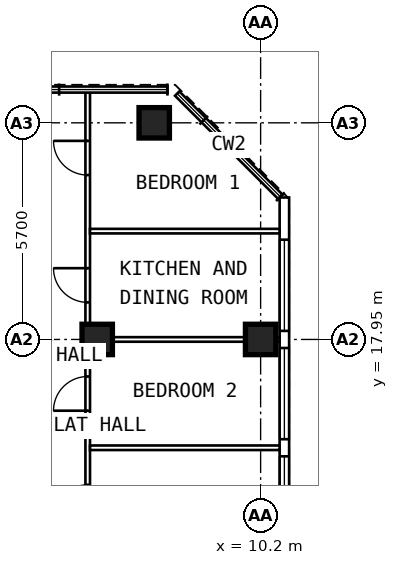
"""IFC4 building model, lengths in metres.
Left out: names, types, materials, properties, quantities, classifications, styles, units other than length and angle.
Written with IfcOpenShell. Run it as: python <this file> out.ifc"""

import sys

from ifc_helpers import new_model, si_unit, direction, frame, frame_2d, origin, origin_2d, place, context, subcontext, project, spatial, rectangle, extrude, element, fill, save


model = new_model("IFC4")
c1 = context("Model", 3, precision=1e-05, world=origin(), true_north=direction((0.0, 1.0)))
c2 = subcontext(c1, "Body", "Model", "MODEL_VIEW")
j1 = project(units=[si_unit("LENGTHUNIT", "METRE"), si_unit("PLANEANGLEUNIT", "RADIAN")], contexts=[c1])
p1 = place(None, origin())
s1 = spatial("IfcSite", under=j1, at=p1, CompositionType="ELEMENT")
p2 = place(p1, origin())
s2 = spatial("IfcBuilding", under=s1, at=p2, CompositionType="ELEMENT")
p3 = place(p2, frame((0.0, 0.0, 289.0)))
s3 = spatial("IfcBuildingStorey", under=s2, at=p3, CompositionType="ELEMENT", Elevation=289.0)
for number, where, z_axis, x_axis in (
    (1, (10.2, 17.95, 0.0), (0.0, 0.0, 1.0), (0.0, 1.0, 0.0)),
    (2, (7.4, 23.65, 0.0), (0.0, 0.0, 1.0), (0.0, 1.0, 0.0)),
    (3, (5.9, 17.95, 0.0), (0.0, 0.0, 1.0), (0.0, 1.0, 0.0)),
):
    element("IfcColumn", number, at=place(p3, frame(where, z_axis=z_axis, x_axis=x_axis)), inside=s3, PredefinedType="COLUMN", context=c2, shape_type="SweptSolid", body=[
        extrude(rectangle(XDim=0.8, YDim=0.8, at=origin_2d()), origin(), (0.0, 0.0, 1.0), 3.6),
    ])
p4 = place(p3, frame((10.825, 6.409, 0.0), z_axis=(0.0, 0.0, 1.0), x_axis=(0.0, 1.0, 0.0)))
e4 = element("IfcWall", 4, at=p4, inside=s3, PredefinedType="SOLIDWALL", context=c2, shape_type="SweptSolid", body=[
    extrude(rectangle(XDim=15.276, YDim=0.25, at=frame_2d((7.638, 0.0))), origin(), (0.0, 0.0, 1.0), 3.35),
])
p5 = place(p4, frame((0.366, 0.0, 0.6)))
e5 = element("IfcOpeningElement", 5, at=p5, cuts=e4, PredefinedType="OPENING", context=c2, shape_type="SweptSolid", body=[
    extrude(rectangle(XDim=2.4, YDim=2.0, at=frame_2d((1.2, 1.0))), frame((0.0, 0.137, 0.0), z_axis=(0.0, -1.0, 0.0), x_axis=(1.0, 0.0, 0.0)), (0.0, 0.0, 1.0), 0.274),
])
p6 = place(p4, frame((3.216, 0.0, 0.6)))
e6 = element("IfcOpeningElement", 6, at=p6, cuts=e4, PredefinedType="OPENING", context=c2, shape_type="SweptSolid", body=[
    extrude(rectangle(XDim=2.4, YDim=2.0, at=frame_2d((1.2, 1.0))), frame((0.0, 0.137, 0.0), z_axis=(0.0, -1.0, 0.0), x_axis=(1.0, 0.0, 0.0)), (0.0, 0.0, 1.0), 0.274),
])
p7 = place(p4, frame((6.066, 0.0, 0.6)))
e7 = element("IfcOpeningElement", 7, at=p7, cuts=e4, PredefinedType="OPENING", context=c2, shape_type="SweptSolid", body=[
    extrude(rectangle(XDim=2.4, YDim=2.0, at=frame_2d((1.2, 1.0))), frame((0.0, 0.137, 0.0), z_axis=(0.0, -1.0, 0.0), x_axis=(1.0, 0.0, 0.0)), (0.0, 0.0, 1.0), 0.274),
])
p8 = place(p4, frame((8.916, 0.0, 0.6)))
e8 = element("IfcOpeningElement", 8, at=p8, cuts=e4, PredefinedType="OPENING", context=c2, shape_type="SweptSolid", body=[
    extrude(rectangle(XDim=2.4, YDim=2.0, at=frame_2d((1.2, 1.0))), frame((0.0, 0.137, 0.0), z_axis=(0.0, -1.0, 0.0), x_axis=(1.0, 0.0, 0.0)), (0.0, 0.0, 1.0), 0.274),
])
p9 = place(p4, frame((11.766, 0.0, 0.6)))
e9 = element("IfcOpeningElement", 9, at=p9, cuts=e4, PredefinedType="OPENING", context=c2, shape_type="SweptSolid", body=[
    extrude(rectangle(XDim=2.4, YDim=2.0, at=frame_2d((1.2, 1.0))), frame((0.0, 0.137, 0.0), z_axis=(0.0, -1.0, 0.0), x_axis=(1.0, 0.0, 0.0)), (0.0, 0.0, 1.0), 0.274),
])
p10 = place(p3, frame((5.65, 9.6, 0.0), z_axis=(0.0, 0.0, 1.0), x_axis=(0.0, 1.0, 0.0)))
e10 = element("IfcWall", 10, at=p10, inside=s3, PredefinedType="PARTITIONING", context=c2, shape_type="SweptSolid", body=[
    extrude(rectangle(XDim=14.845, YDim=0.12, at=frame_2d((7.422, 0.0))), origin(), (0.0, 0.0, 1.0), 3.35),
])
p11 = place(p10, frame((1.075, 0.0, 0.0)))
e11 = element("IfcOpeningElement", 11, at=p11, cuts=e10, PredefinedType="OPENING", context=c2, shape_type="SweptSolid", body=[
    extrude(rectangle(XDim=0.9, YDim=2.1, at=frame_2d((0.45, 1.05))), frame((0.0, 0.072, 0.0), z_axis=(0.0, -1.0, 0.0), x_axis=(1.0, 0.0, 0.0)), (0.0, 0.0, 1.0), 0.144),
])
p12 = place(p10, frame((3.625, 0.0, 0.0)))
e12 = element("IfcOpeningElement", 12, at=p12, cuts=e10, PredefinedType="OPENING", context=c2, shape_type="SweptSolid", body=[
    extrude(rectangle(XDim=0.9, YDim=2.1, at=frame_2d((0.45, 1.05))), frame((0.0, 0.072, 0.0), z_axis=(0.0, -1.0, 0.0), x_axis=(1.0, 0.0, 0.0)), (0.0, 0.0, 1.0), 0.144),
])
p13 = place(p10, frame((6.475, 0.0, 0.0)))
e13 = element("IfcOpeningElement", 13, at=p13, cuts=e10, PredefinedType="OPENING", context=c2, shape_type="SweptSolid", body=[
    extrude(rectangle(XDim=0.9, YDim=2.1, at=frame_2d((0.45, 1.05))), frame((0.0, 0.072, 0.0), z_axis=(0.0, -1.0, 0.0), x_axis=(1.0, 0.0, 0.0)), (0.0, 0.0, 1.0), 0.144),
])
p14 = place(p10, frame((9.325, 0.0, 0.0)))
e14 = element("IfcOpeningElement", 14, at=p14, cuts=e10, PredefinedType="OPENING", context=c2, shape_type="SweptSolid", body=[
    extrude(rectangle(XDim=0.9, YDim=2.1, at=frame_2d((0.45, 1.05))), frame((0.0, 0.072, 0.0), z_axis=(0.0, -1.0, 0.0), x_axis=(1.0, 0.0, 0.0)), (0.0, 0.0, 1.0), 0.144),
])
p15 = place(p10, frame((12.675, 0.0, 0.0)))
e15 = element("IfcOpeningElement", 15, at=p15, cuts=e10, PredefinedType="OPENING", context=c2, shape_type="SweptSolid", body=[
    extrude(rectangle(XDim=0.9, YDim=2.1, at=frame_2d((0.45, 1.05))), frame((0.0, 0.072, 0.0), z_axis=(0.0, -1.0, 0.0), x_axis=(1.0, 0.0, 0.0)), (0.0, 0.0, 1.0), 0.144),
])
p16 = place(p3, frame((5.71, 15.1, 0.0), z_axis=(0.0, 0.0, 1.0), x_axis=(1.0, 0.0, 0.0)))
e16 = element("IfcWall", 16, at=p16, inside=s3, PredefinedType="PARTITIONING", context=c2, shape_type="SweptSolid", body=[
    extrude(rectangle(XDim=4.99, YDim=0.12, at=frame_2d((2.495, 0.0))), origin(), (0.0, 0.0, 1.0), 3.35),
])
p17 = place(p3, frame((5.71, 17.95, 0.0), z_axis=(0.0, 0.0, 1.0), x_axis=(1.0, 0.0, 0.0)))
e17 = element("IfcWall", 17, at=p17, inside=s3, PredefinedType="PARTITIONING", context=c2, shape_type="SweptSolid", body=[
    extrude(rectangle(XDim=4.99, YDim=0.12, at=frame_2d((2.495, 0.0))), origin(), (0.0, 0.0, 1.0), 2.45),
])
p18 = place(p3, frame((5.71, 20.8, 0.0), z_axis=(0.0, 0.0, 1.0), x_axis=(1.0, 0.0, 0.0)))
e18 = element("IfcWall", 18, at=p18, inside=s3, PredefinedType="PARTITIONING", context=c2, shape_type="SweptSolid", body=[
    extrude(rectangle(XDim=4.99, YDim=0.12, at=frame_2d((2.495, 0.0))), origin(), (0.0, 0.0, 1.0), 3.35),
])
p19 = place(p7, origin())
e19 = element("IfcWindow", 19, at=p19, inside=s3, PartitioningType="SINGLE_PANEL", PredefinedType="WINDOW", context=c2, shape_type="SweptSolid", body=[
    extrude(rectangle(XDim=2.4, YDim=2.0, at=frame_2d((1.2, 1.0))), frame((0.0, 0.03, 0.0), z_axis=(0.0, -1.0, 0.0), x_axis=(1.0, 0.0, 0.0)), (0.0, 0.0, 1.0), 0.06),
])
fill(e7, e19)
p20 = place(p8, origin())
e20 = element("IfcWindow", 20, at=p20, inside=s3, PartitioningType="SINGLE_PANEL", PredefinedType="WINDOW", context=c2, shape_type="SweptSolid", body=[
    extrude(rectangle(XDim=2.4, YDim=2.0, at=frame_2d((1.2, 1.0))), frame((0.0, 0.03, 0.0), z_axis=(0.0, -1.0, 0.0), x_axis=(1.0, 0.0, 0.0)), (0.0, 0.0, 1.0), 0.06),
])
fill(e8, e20)
p21 = place(p9, origin())
e21 = element("IfcWindow", 21, at=p21, inside=s3, PartitioningType="SINGLE_PANEL", PredefinedType="WINDOW", context=c2, shape_type="SweptSolid", body=[
    extrude(rectangle(XDim=2.4, YDim=2.0, at=frame_2d((1.2, 1.0))), frame((0.0, 0.03, 0.0), z_axis=(0.0, -1.0, 0.0), x_axis=(1.0, 0.0, 0.0)), (0.0, 0.0, 1.0), 0.06),
])
fill(e9, e21)
p22 = place(p12, origin())
e22 = element("IfcDoor", 22, at=p22, inside=s3, OperationType="SINGLE_SWING_LEFT", PredefinedType="DOOR", context=c2, shape_type="SweptSolid", body=[
    extrude(rectangle(XDim=0.9, YDim=2.1, at=frame_2d((0.45, 1.05))), frame((0.0, 0.025, 0.0), z_axis=(0.0, -1.0, 0.0), x_axis=(1.0, 0.0, 0.0)), (0.0, 0.0, 1.0), 0.05),
])
fill(e12, e22)
p23 = place(p13, origin())
e23 = element("IfcDoor", 23, at=p23, inside=s3, OperationType="SINGLE_SWING_LEFT", PredefinedType="DOOR", context=c2, shape_type="SweptSolid", body=[
    extrude(rectangle(XDim=0.9, YDim=2.1, at=frame_2d((0.45, 1.05))), frame((0.0, 0.025, 0.0), z_axis=(0.0, -1.0, 0.0), x_axis=(1.0, 0.0, 0.0)), (0.0, 0.0, 1.0), 0.05),
])
fill(e13, e23)
p24 = place(p14, origin())
e24 = element("IfcDoor", 24, at=p24, inside=s3, OperationType="SINGLE_SWING_RIGHT", PredefinedType="DOOR", context=c2, shape_type="SweptSolid", body=[
    extrude(rectangle(XDim=0.9, YDim=2.1, at=frame_2d((0.45, 1.05))), frame((0.0, 0.025, 0.0), z_axis=(0.0, -1.0, 0.0), x_axis=(1.0, 0.0, 0.0)), (0.0, 0.0, 1.0), 0.05),
])
fill(e14, e24)
p25 = place(p15, origin())
e25 = element("IfcDoor", 25, at=p25, inside=s3, OperationType="SINGLE_SWING_RIGHT", PredefinedType="DOOR", context=c2, shape_type="SweptSolid", body=[
    extrude(rectangle(XDim=0.9, YDim=2.1, at=frame_2d((0.45, 1.05))), frame((0.0, 0.025, 0.0), z_axis=(0.0, -1.0, 0.0), x_axis=(1.0, 0.0, 0.0)), (0.0, 0.0, 1.0), 0.05),
])
fill(e15, e25)
save(model, sys.argv[1])
